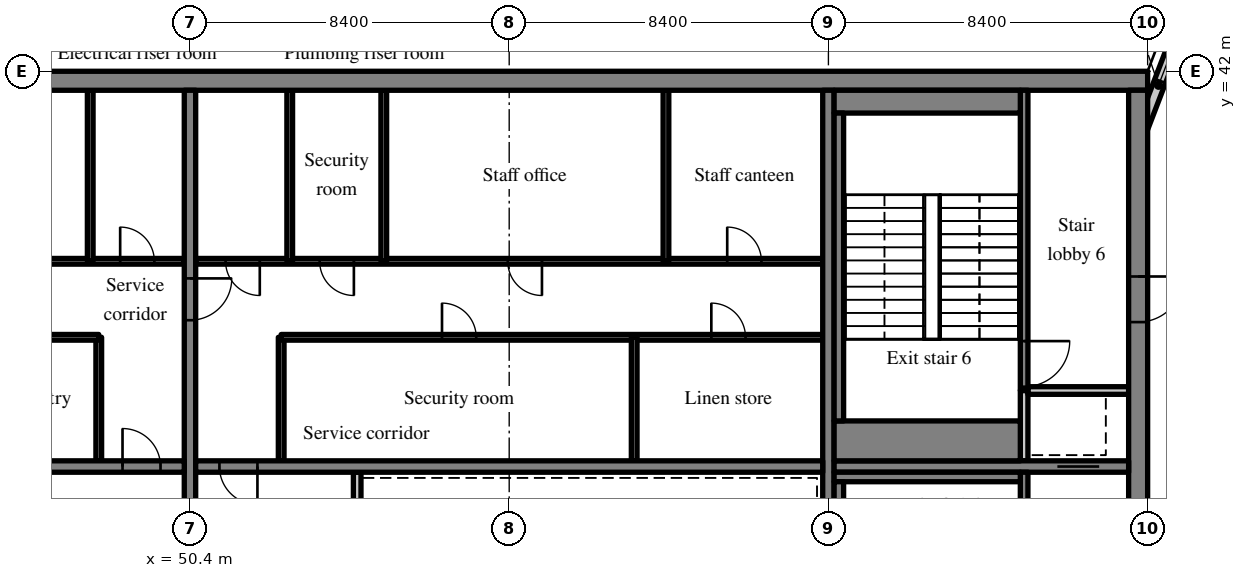
"""IFC4 building model, lengths in metres.
Left out: names, types, materials, properties, quantities, classifications, styles, units other than length and angle.
Written with IfcOpenShell. Run it as: python <this file> out.ifc"""

import sys

from ifc_helpers import new_model, si_unit, direction, frame, frame_2d, origin, place, context, subcontext, project, spatial, rectangle, extrude, source, transform, mapped, element, fill, save


model = new_model("IFC4")
c1 = context("Model", 3, precision=1e-05, world=origin(), true_north=direction((0.0, 1.0)))
c2 = subcontext(c1, "Body", "Model", "MODEL_VIEW")
j1 = project(units=[si_unit("LENGTHUNIT", "METRE"), si_unit("PLANEANGLEUNIT", "RADIAN")], contexts=[c1])
p1 = place(None, origin())
s1 = spatial("IfcSite", under=j1, at=p1, CompositionType="ELEMENT")
p2 = place(p1, origin())
s2 = spatial("IfcBuilding", under=s1, at=p2, CompositionType="ELEMENT")
p3 = place(p2, frame((0.0, 0.0, 313.7)))
s3 = spatial("IfcBuildingStorey", under=s2, at=p3, CompositionType="ELEMENT", Elevation=313.7)
m1 = source(origin(), c2, "Body", "SweptSolid", [
    extrude(rectangle(XDim=50.4, YDim=0.5, at=frame_2d((25.2, 0.0))), origin(), (0.0, 0.0, 1.0), 3.72),
])
p4 = place(p3, frame((25.2, 41.75, 0.0), z_axis=(0.0, 0.0, 1.0), x_axis=(1.0, 0.0, 0.0)))
e1 = element("IfcWall", 1, at=p4, inside=s3, PredefinedType="SHEAR", context=c2, shape_type="MappedRepresentation", body=[
    mapped(m1, transform((0.0, 0.0, 0.0), scale=1.0)),
])
m2 = source(origin(), c2, "Body", "SweptSolid", [
    extrude(rectangle(XDim=19.0, YDim=0.5, at=frame_2d((9.5, 0.0))), origin(), (0.0, 0.0, 1.0), 3.72),
])
p5 = place(p3, frame((75.35, 22.5, 0.0), z_axis=(0.0, 0.0, 1.0), x_axis=(0.0, 1.0, 0.0)))
e2 = element("IfcWall", 2, at=p5, inside=s3, PredefinedType="SHEAR", context=c2, shape_type="MappedRepresentation", body=[
    mapped(m2, transform((0.0, 0.0, 0.0), scale=1.0)),
])
m3 = source(origin(), c2, "Body", "SweptSolid", [
    extrude(rectangle(XDim=1.2, YDim=2.1, at=frame_2d((0.6, 1.05))), frame((0.0, 0.26, 0.0), z_axis=(0.0, -1.0, 0.0), x_axis=(1.0, 0.0, 0.0)), (0.0, 0.0, 1.0), 0.52),
])
p6 = place(p5, frame((12.9, 0.0, 0.0)))
e3 = element("IfcOpeningElement", 3, at=p6, cuts=e2, PredefinedType="OPENING", context=c2, shape_type="MappedRepresentation", body=[
    mapped(m3, transform((0.0, 0.0, 0.0), scale=1.0)),
])
m4 = source(origin(), c2, "Body", "SweptSolid", [
    extrude(rectangle(XDim=19.0, YDim=0.3, at=frame_2d((9.5, 0.0))), origin(), (0.0, 0.0, 1.0), 3.72),
])
p7 = place(p3, frame((50.4, 22.5, 0.0), z_axis=(0.0, 0.0, 1.0), x_axis=(0.0, 1.0, 0.0)))
e4 = element("IfcWall", 4, at=p7, inside=s3, PredefinedType="SHEAR", context=c2, shape_type="MappedRepresentation", body=[
    mapped(m4, transform((0.0, 0.0, 0.0), scale=1.0)),
])
m5 = source(origin(), c2, "Body", "SweptSolid", [
    extrude(rectangle(XDim=1.1, YDim=2.1, at=frame_2d((0.55, 1.05))), frame((0.0, 0.16, 0.0), z_axis=(0.0, -1.0, 0.0), x_axis=(1.0, 0.0, 0.0)), (0.0, 0.0, 1.0), 0.32),
])
p8 = place(p7, frame((12.95, 0.0, 0.0)))
e5 = element("IfcOpeningElement", 5, at=p8, cuts=e4, PredefinedType="OPENING", context=c2, shape_type="MappedRepresentation", body=[
    mapped(m5, transform((0.0, 0.0, 0.0), scale=1.0)),
])
p9 = place(p3, frame((67.2, 22.5, 0.0), z_axis=(0.0, 0.0, 1.0), x_axis=(0.0, 1.0, 0.0)))
e6 = element("IfcWall", 6, at=p9, inside=s3, PredefinedType="SHEAR", context=c2, shape_type="MappedRepresentation", body=[
    mapped(m4, transform((0.0, 0.0, 0.0), scale=1.0)),
])
m6 = source(origin(), c2, "Body", "SweptSolid", [
    extrude(rectangle(XDim=16.5, YDim=0.3, at=frame_2d((8.25, 0.0))), origin(), (0.0, 0.0, 1.0), 3.72),
])
p10 = place(p3, frame((33.75, 31.6, 0.0), z_axis=(0.0, 0.0, 1.0), x_axis=(1.0, 0.0, 0.0)))
e7 = element("IfcWall", 7, at=p10, inside=s3, PredefinedType="SHEAR", context=c2, shape_type="MappedRepresentation", body=[
    mapped(m6, transform((0.0, 0.0, 0.0), scale=1.0)),
])
m7 = source(origin(), c2, "Body", "SweptSolid", [
    extrude(rectangle(XDim=1.0, YDim=2.1, at=frame_2d((0.5, 1.05))), frame((0.0, 0.16, 0.0), z_axis=(0.0, -1.0, 0.0), x_axis=(1.0, 0.0, 0.0)), (0.0, 0.0, 1.0), 0.32),
])
p11 = place(p10, frame((14.875, 0.0, 0.0)))
e8 = element("IfcOpeningElement", 8, at=p11, cuts=e7, PredefinedType="OPENING", context=c2, shape_type="MappedRepresentation", body=[
    mapped(m7, transform((0.0, 0.0, 0.0), scale=1.0)),
])
p12 = place(p3, frame((50.55, 31.6, 0.0), z_axis=(0.0, 0.0, 1.0), x_axis=(1.0, 0.0, 0.0)))
e9 = element("IfcWall", 9, at=p12, inside=s3, PredefinedType="SHEAR", context=c2, shape_type="MappedRepresentation", body=[
    mapped(m6, transform((0.0, 0.0, 0.0), scale=1.0)),
])
p13 = place(p12, frame((0.625, 0.0, 0.0)))
e10 = element("IfcOpeningElement", 10, at=p13, cuts=e9, PredefinedType="OPENING", context=c2, shape_type="MappedRepresentation", body=[
    mapped(m7, transform((0.0, 0.0, 0.0), scale=1.0)),
])
m8 = source(origin(), c2, "Body", "SweptSolid", [
    extrude(rectangle(XDim=7.75, YDim=0.3, at=frame_2d((3.875, 0.0))), origin(), (0.0, 0.0, 1.0), 3.72),
])
p14 = place(p3, frame((67.35, 31.6, 0.0), z_axis=(0.0, 0.0, 1.0), x_axis=(1.0, 0.0, 0.0)))
e11 = element("IfcWall", 11, at=p14, inside=s3, PredefinedType="SHEAR", context=c2, shape_type="MappedRepresentation", body=[
    mapped(m8, transform((0.0, 0.0, 0.0), scale=1.0)),
])
p15 = place(p14, frame((5.875, 0.0, 0.0)))
e12 = element("IfcOpeningElement", 12, at=p15, cuts=e11, PredefinedType="OPENING", context=c2, shape_type="MappedRepresentation", body=[
    mapped(m5, transform((0.0, 0.0, 0.0), scale=1.0)),
])
m9 = source(origin(), c2, "Body", "SweptSolid", [
    extrude(rectangle(XDim=3.559, YDim=0.3, at=frame_2d((1.78, 0.0))), origin(), (0.0, 0.0, 1.0), 3.72),
])
p16 = place(p3, frame((76.523, 43.292, 0.0), z_axis=(0.0, 0.0, 1.0), x_axis=(-0.35779745313, -0.933799219604, 0.0)))
e13 = element("IfcWall", 13, at=p16, inside=s3, PredefinedType="SOLIDWALL", context=c2, shape_type="MappedRepresentation", body=[
    mapped(m9, transform((0.0, 0.0, 0.0), scale=1.0)),
])
m10 = source(origin(), c2, "Body", "SweptSolid", [
    extrude(rectangle(XDim=1.5, YDim=2.0, at=frame_2d((0.75, 1.0))), frame((0.0, 0.16, 0.0), z_axis=(0.0, -1.0, 0.0), x_axis=(1.0, 0.0, 0.0)), (0.0, 0.0, 1.0), 0.32),
])
p17 = place(p16, frame((0.156, 0.0, 0.9)))
e14 = element("IfcOpeningElement", 14, at=p17, cuts=e13, PredefinedType="OPENING", context=c2, shape_type="MappedRepresentation", body=[
    mapped(m10, transform((0.0, 0.0, 0.0), scale=1.0)),
])
m11 = source(origin(), c2, "Body", "SweptSolid", [
    extrude(rectangle(XDim=3.25, YDim=0.15, at=frame_2d((1.625, 0.0))), origin(), (0.0, 0.0, 1.0), 3.72),
])
p18 = place(p3, frame((48.0, 31.75, 0.0), z_axis=(0.0, 0.0, 1.0), x_axis=(0.0, 1.0, 0.0)))
e15 = element("IfcWall", 15, at=p18, inside=s3, PredefinedType="PARTITIONING", context=c2, shape_type="MappedRepresentation", body=[
    mapped(m11, transform((0.0, 0.0, 0.0), scale=1.0)),
])
m12 = source(origin(), c2, "Body", "SweptSolid", [
    extrude(rectangle(XDim=14.25, YDim=0.15, at=frame_2d((7.125, 0.0))), origin(), (0.0, 0.0, 1.0), 3.72),
])
p19 = place(p3, frame((33.75, 35.0, 0.0), z_axis=(0.0, 0.0, 1.0), x_axis=(1.0, 0.0, 0.0)))
e16 = element("IfcWall", 16, at=p19, inside=s3, PredefinedType="PARTITIONING", context=c2, shape_type="MappedRepresentation", body=[
    mapped(m12, transform((0.0, 0.0, 0.0), scale=1.0)),
])
m13 = source(origin(), c2, "Body", "SweptSolid", [
    extrude(rectangle(XDim=0.9, YDim=2.1, at=frame_2d((0.45, 1.05))), frame((0.0, 0.085, 0.0), z_axis=(0.0, -1.0, 0.0), x_axis=(1.0, 0.0, 0.0)), (0.0, 0.0, 1.0), 0.17),
])
p20 = place(p19, frame((0.968, 0.0, 0.0)))
e17 = element("IfcOpeningElement", 17, at=p20, cuts=e16, PredefinedType="OPENING", context=c2, shape_type="MappedRepresentation", body=[
    mapped(m13, transform((0.0, 0.0, 0.0), scale=1.0)),
])
p21 = place(p19, frame((5.929, 0.0, 0.0)))
e18 = element("IfcOpeningElement", 18, at=p21, cuts=e16, PredefinedType="OPENING", context=c2, shape_type="MappedRepresentation", body=[
    mapped(m13, transform((0.0, 0.0, 0.0), scale=1.0)),
])
p22 = place(p19, frame((11.599, 0.0, 0.0)))
e19 = element("IfcOpeningElement", 19, at=p22, cuts=e16, PredefinedType="OPENING", context=c2, shape_type="MappedRepresentation", body=[
    mapped(m13, transform((0.0, 0.0, 0.0), scale=1.0)),
])
m14 = source(origin(), c2, "Body", "SweptSolid", [
    extrude(rectangle(XDim=16.5, YDim=0.15, at=frame_2d((8.25, 0.0))), origin(), (0.0, 0.0, 1.0), 3.72),
])
p23 = place(p3, frame((33.75, 37.0, 0.0), z_axis=(0.0, 0.0, 1.0), x_axis=(1.0, 0.0, 0.0)))
e20 = element("IfcWall", 20, at=p23, inside=s3, PredefinedType="PARTITIONING", context=c2, shape_type="MappedRepresentation", body=[
    mapped(m14, transform((0.0, 0.0, 0.0), scale=1.0)),
])
p24 = place(p23, frame((6.563, 0.0, 0.0)))
e21 = element("IfcOpeningElement", 21, at=p24, cuts=e20, PredefinedType="OPENING", context=c2, shape_type="MappedRepresentation", body=[
    mapped(m13, transform((0.0, 0.0, 0.0), scale=1.0)),
])
p25 = place(p23, frame((14.813, 0.0, 0.0)))
e22 = element("IfcOpeningElement", 22, at=p25, cuts=e20, PredefinedType="OPENING", context=c2, shape_type="MappedRepresentation", body=[
    mapped(m13, transform((0.0, 0.0, 0.0), scale=1.0)),
])
m15 = source(origin(), c2, "Body", "SweptSolid", [
    extrude(rectangle(XDim=4.5, YDim=0.15, at=frame_2d((2.25, 0.0))), origin(), (0.0, 0.0, 1.0), 3.72),
])
p26 = place(p3, frame((47.775, 37.0, 0.0), z_axis=(0.0, 0.0, 1.0), x_axis=(0.0, 1.0, 0.0)))
e23 = element("IfcWall", 23, at=p26, inside=s3, PredefinedType="PARTITIONING", context=c2, shape_type="MappedRepresentation", body=[
    mapped(m15, transform((0.0, 0.0, 0.0), scale=1.0)),
])
m16 = source(origin(), c2, "Body", "SweptSolid", [
    extrude(rectangle(XDim=2.65, YDim=0.2, at=frame_2d((1.325, 0.0))), origin(), (0.0, 0.0, 1.0), 3.72),
])
p27 = place(p3, frame((54.8, 28.8, 0.0), z_axis=(0.0, 0.0, 1.0), x_axis=(0.0, 1.0, 0.0)))
e24 = element("IfcWall", 24, at=p27, inside=s3, PredefinedType="SOLIDWALL", context=c2, shape_type="MappedRepresentation", body=[
    mapped(m16, transform((0.0, 0.0, 0.0), scale=1.0)),
])
p28 = place(p3, frame((52.8, 31.75, 0.0), z_axis=(0.0, 0.0, 1.0), x_axis=(0.0, 1.0, 0.0)))
e25 = element("IfcWall", 25, at=p28, inside=s3, PredefinedType="PARTITIONING", context=c2, shape_type="MappedRepresentation", body=[
    mapped(m11, transform((0.0, 0.0, 0.0), scale=1.0)),
])
p29 = place(p3, frame((67.05, 35.0, 0.0), z_axis=(0.0, 0.0, 1.0), x_axis=(-1.0, 0.0, 0.0)))
e26 = element("IfcWall", 26, at=p29, inside=s3, PredefinedType="PARTITIONING", context=c2, shape_type="MappedRepresentation", body=[
    mapped(m12, transform((0.0, 0.0, 0.0), scale=1.0)),
])
p30 = place(p29, frame((2.031, 0.0, 0.0)))
e27 = element("IfcOpeningElement", 27, at=p30, cuts=e26, PredefinedType="OPENING", context=c2, shape_type="MappedRepresentation", body=[
    mapped(m13, transform((0.0, 0.0, 0.0), scale=1.0)),
])
p31 = place(p29, frame((9.118, 0.0, 0.0)))
e28 = element("IfcOpeningElement", 28, at=p31, cuts=e26, PredefinedType="OPENING", context=c2, shape_type="MappedRepresentation", body=[
    mapped(m13, transform((0.0, 0.0, 0.0), scale=1.0)),
])
p32 = place(p3, frame((67.05, 37.0, 0.0), z_axis=(0.0, 0.0, 1.0), x_axis=(-1.0, 0.0, 0.0)))
e29 = element("IfcWall", 29, at=p32, inside=s3, PredefinedType="PARTITIONING", context=c2, shape_type="MappedRepresentation", body=[
    mapped(m14, transform((0.0, 0.0, 0.0), scale=1.0)),
])
p33 = place(p32, frame((1.613, 0.0, 0.0)))
e30 = element("IfcOpeningElement", 30, at=p33, cuts=e29, PredefinedType="OPENING", context=c2, shape_type="MappedRepresentation", body=[
    mapped(m13, transform((0.0, 0.0, 0.0), scale=1.0)),
])
p34 = place(p32, frame((7.388, 0.0, 0.0)))
e31 = element("IfcOpeningElement", 31, at=p34, cuts=e29, PredefinedType="OPENING", context=c2, shape_type="MappedRepresentation", body=[
    mapped(m13, transform((0.0, 0.0, 0.0), scale=1.0)),
])
p35 = place(p32, frame((12.337, 0.0, 0.0)))
e32 = element("IfcOpeningElement", 32, at=p35, cuts=e29, PredefinedType="OPENING", context=c2, shape_type="MappedRepresentation", body=[
    mapped(m13, transform((0.0, 0.0, 0.0), scale=1.0)),
])
p36 = place(p32, frame((14.813, 0.0, 0.0)))
e33 = element("IfcOpeningElement", 33, at=p36, cuts=e29, PredefinedType="OPENING", context=c2, shape_type="MappedRepresentation", body=[
    mapped(m13, transform((0.0, 0.0, 0.0), scale=1.0)),
])
p37 = place(p3, frame((62.089, 31.75, 0.0), z_axis=(0.0, 0.0, 1.0), x_axis=(0.0, 1.0, 0.0)))
e34 = element("IfcWall", 34, at=p37, inside=s3, PredefinedType="PARTITIONING", context=c2, shape_type="MappedRepresentation", body=[
    mapped(m11, transform((0.0, 0.0, 0.0), scale=1.0)),
])
for number, where, z_axis, x_axis in (
    (35, (62.925, 37.0, 0.0), (0.0, 0.0, 1.0), (0.0, 1.0, 0.0)),
    (36, (55.5, 37.0, 0.0), (0.0, 0.0, 1.0), (0.0, 1.0, 0.0)),
    (37, (53.025, 37.0, 0.0), (0.0, 0.0, 1.0), (0.0, 1.0, 0.0)),
):
    element("IfcWall", number, at=place(p3, frame(where, z_axis=z_axis, x_axis=x_axis)), inside=s3, PredefinedType="PARTITIONING", context=c2, shape_type="MappedRepresentation", body=[
        mapped(m15, transform((0.0, 0.0, 0.0), scale=1.0)),
    ])
m17 = source(origin(), c2, "Body", "SweptSolid", [
    extrude(rectangle(XDim=8.95, YDim=0.2, at=frame_2d((4.475, 0.0))), origin(), (0.0, 0.0, 1.0), 3.72),
])
p38 = place(p3, frame((72.35, 22.5, 0.0), z_axis=(0.0, 0.0, 1.0), x_axis=(0.0, 1.0, 0.0)))
e38 = element("IfcWall", 38, at=p38, inside=s3, PredefinedType="SOLIDWALL", context=c2, shape_type="MappedRepresentation", body=[
    mapped(m17, transform((0.0, 0.0, 0.0), scale=1.0)),
])
m18 = source(origin(), c2, "Body", "SweptSolid", [
    extrude(rectangle(XDim=1.2, YDim=2.1, at=frame_2d((0.6, 1.05))), frame((0.0, 0.11, 0.0), z_axis=(0.0, -1.0, 0.0), x_axis=(1.0, 0.0, 0.0)), (0.0, 0.0, 1.0), 0.22),
])
p39 = place(p38, frame((1.1, 0.0, 0.0)))
e39 = element("IfcOpeningElement", 39, at=p39, cuts=e38, PredefinedType="OPENING", context=c2, shape_type="MappedRepresentation", body=[
    mapped(m18, transform((0.0, 0.0, 0.0), scale=1.0)),
])
m19 = source(origin(), c2, "Body", "SweptSolid", [
    extrude(rectangle(XDim=1.85, YDim=0.2, at=frame_2d((0.925, 0.0))), origin(), (0.0, 0.0, 1.0), 3.72),
])
p40 = place(p3, frame((72.35, 31.75, 0.0), z_axis=(0.0, 0.0, 1.0), x_axis=(0.0, 1.0, 0.0)))
e40 = element("IfcWall", 40, at=p40, inside=s3, PredefinedType="SOLIDWALL", context=c2, shape_type="MappedRepresentation", body=[
    mapped(m19, transform((0.0, 0.0, 0.0), scale=1.0)),
])
m20 = source(origin(), c2, "Body", "SweptSolid", [
    extrude(rectangle(XDim=2.65, YDim=0.2, at=frame_2d((1.325, 0.0))), origin(), (0.0, 0.0, 1.0), 3.72),
])
p41 = place(p3, frame((72.45, 33.6, 0.0), z_axis=(0.0, 0.0, 1.0), x_axis=(1.0, 0.0, 0.0)))
e41 = element("IfcWall", 41, at=p41, inside=s3, PredefinedType="SOLIDWALL", context=c2, shape_type="MappedRepresentation", body=[
    mapped(m20, transform((0.0, 0.0, 0.0), scale=1.0)),
])
m21 = source(origin(), c2, "Body", "SweptSolid", [
    extrude(rectangle(XDim=7.9, YDim=0.2, at=frame_2d((3.95, 0.0))), origin(), (0.0, 0.0, 1.0), 3.72),
])
p42 = place(p3, frame((72.35, 33.6, 0.0), z_axis=(0.0, 0.0, 1.0), x_axis=(0.0, 1.0, 0.0)))
e42 = element("IfcWall", 42, at=p42, inside=s3, PredefinedType="SOLIDWALL", context=c2, shape_type="MappedRepresentation", body=[
    mapped(m21, transform((0.0, 0.0, 0.0), scale=1.0)),
])
p43 = place(p42, frame((0.1, 0.0, 0.0)))
e43 = element("IfcOpeningElement", 43, at=p43, cuts=e42, PredefinedType="OPENING", context=c2, shape_type="MappedRepresentation", body=[
    mapped(m18, transform((0.0, 0.0, 0.0), scale=1.0)),
])
m22 = source(origin(), c2, "Body", "SweptSolid", [
    extrude(rectangle(XDim=4.9, YDim=0.25, at=frame_2d((2.45, 0.0))), origin(), (0.0, 0.0, 1.0), 3.72),
])
p44 = place(p3, frame((67.35, 31.325, 0.0), z_axis=(0.0, 0.0, 1.0), x_axis=(1.0, 0.0, 0.0)))
e44 = element("IfcWall", 44, at=p44, inside=s3, PredefinedType="SOLIDWALL", context=c2, shape_type="MappedRepresentation", body=[
    mapped(m22, transform((0.0, 0.0, 0.0), scale=1.0)),
])
m23 = source(origin(), c2, "Body", "SweptSolid", [
    extrude(rectangle(XDim=8.1, YDim=0.25, at=frame_2d((4.05, 0.0))), origin(), (0.0, 0.0, 1.0), 3.72),
])
p45 = place(p3, frame((67.475, 23.1, 0.0), z_axis=(0.0, 0.0, 1.0), x_axis=(0.0, 1.0, 0.0)))
e45 = element("IfcWall", 45, at=p45, inside=s3, PredefinedType="SOLIDWALL", context=c2, shape_type="MappedRepresentation", body=[
    mapped(m23, transform((0.0, 0.0, 0.0), scale=1.0)),
])
m24 = source(origin(), c2, "Body", "SweptSolid", [
    extrude(rectangle(XDim=4.9, YDim=0.6, at=frame_2d((2.45, 0.0))), origin(), (0.0, 0.0, 1.0), 3.72),
])
p46 = place(p3, frame((67.35, 41.2, 0.0), z_axis=(0.0, 0.0, 1.0), x_axis=(1.0, 0.0, 0.0)))
e46 = element("IfcWall", 46, at=p46, inside=s3, PredefinedType="SOLIDWALL", context=c2, shape_type="MappedRepresentation", body=[
    mapped(m24, transform((0.0, 0.0, 0.0), scale=1.0)),
])
m25 = source(origin(), c2, "Body", "SweptSolid", [
    extrude(rectangle(XDim=4.9, YDim=1.05, at=frame_2d((2.45, 0.0))), origin(), (0.0, 0.0, 1.0), 3.72),
])
p47 = place(p3, frame((67.35, 32.275, 0.0), z_axis=(0.0, 0.0, 1.0), x_axis=(1.0, 0.0, 0.0)))
e47 = element("IfcWall", 47, at=p47, inside=s3, PredefinedType="SOLIDWALL", context=c2, shape_type="MappedRepresentation", body=[
    mapped(m25, transform((0.0, 0.0, 0.0), scale=1.0)),
])
p48 = place(p3, frame((67.475, 32.8, 0.0), z_axis=(0.0, 0.0, 1.0), x_axis=(0.0, 1.0, 0.0)))
e48 = element("IfcWall", 48, at=p48, inside=s3, PredefinedType="SOLIDWALL", context=c2, shape_type="MappedRepresentation", body=[
    mapped(m23, transform((0.0, 0.0, 0.0), scale=1.0)),
])
m26 = source(origin(), c2, "Body", "SweptSolid", [
    extrude(rectangle(XDim=1.5, YDim=2.0, at=frame_2d((0.75, 1.0))), frame((0.0, 0.03, 0.0), z_axis=(0.0, -1.0, 0.0), x_axis=(1.0, 0.0, 0.0)), (0.0, 0.0, 1.0), 0.06),
])
p49 = place(p17, origin())
e49 = element("IfcWindow", 49, at=p49, inside=s3, PartitioningType="SINGLE_PANEL", PredefinedType="WINDOW", context=c2, shape_type="MappedRepresentation", body=[
    mapped(m26, transform((0.0, 0.0, 0.0), scale=1.0)),
])
fill(e14, e49)
m27 = source(origin(), c2, "Body", "SweptSolid", [
    extrude(rectangle(XDim=1.0, YDim=2.1, at=frame_2d((0.5, 1.05))), frame((0.0, 0.025, 0.0), z_axis=(0.0, -1.0, 0.0), x_axis=(1.0, 0.0, 0.0)), (0.0, 0.0, 1.0), 0.05),
])
p50 = place(p11, origin())
e50 = element("IfcDoor", 50, at=p50, inside=s3, OperationType="SINGLE_SWING_LEFT", PredefinedType="DOOR", context=c2, shape_type="MappedRepresentation", body=[
    mapped(m27, transform((0.0, 0.0, 0.0), scale=1.0)),
])
fill(e8, e50)
m28 = source(origin(), c2, "Body", "SweptSolid", [
    extrude(rectangle(XDim=0.9, YDim=2.1, at=frame_2d((0.45, 1.05))), frame((0.0, 0.025, 0.0), z_axis=(0.0, -1.0, 0.0), x_axis=(1.0, 0.0, 0.0)), (0.0, 0.0, 1.0), 0.05),
])
p51 = place(p25, origin())
e51 = element("IfcDoor", 51, at=p51, inside=s3, OperationType="SINGLE_SWING_LEFT", PredefinedType="DOOR", context=c2, shape_type="MappedRepresentation", body=[
    mapped(m28, transform((0.0, 0.0, 0.0), scale=1.0)),
])
fill(e22, e51)
p52 = place(p13, origin())
e52 = element("IfcDoor", 52, at=p52, inside=s3, OperationType="SINGLE_SWING_RIGHT", PredefinedType="DOOR", context=c2, shape_type="MappedRepresentation", body=[
    mapped(m27, transform((0.0, 0.0, 0.0), scale=1.0)),
])
fill(e10, e52)
p53 = place(p30, origin())
e53 = element("IfcDoor", 53, at=p53, inside=s3, OperationType="SINGLE_SWING_RIGHT", PredefinedType="DOOR", context=c2, shape_type="MappedRepresentation", body=[
    mapped(m28, transform((0.0, 0.0, 0.0), scale=1.0)),
])
fill(e27, e53)
p54 = place(p31, origin())
e54 = element("IfcDoor", 54, at=p54, inside=s3, OperationType="SINGLE_SWING_RIGHT", PredefinedType="DOOR", context=c2, shape_type="MappedRepresentation", body=[
    mapped(m28, transform((0.0, 0.0, 0.0), scale=1.0)),
])
fill(e28, e54)
p55 = place(p33, origin())
e55 = element("IfcDoor", 55, at=p55, inside=s3, OperationType="SINGLE_SWING_RIGHT", PredefinedType="DOOR", context=c2, shape_type="MappedRepresentation", body=[
    mapped(m28, transform((0.0, 0.0, 0.0), scale=1.0)),
])
fill(e30, e55)
p56 = place(p34, origin())
e56 = element("IfcDoor", 56, at=p56, inside=s3, OperationType="SINGLE_SWING_LEFT", PredefinedType="DOOR", context=c2, shape_type="MappedRepresentation", body=[
    mapped(m28, transform((0.0, 0.0, 0.0), scale=1.0)),
])
fill(e31, e56)
p57 = place(p35, origin())
e57 = element("IfcDoor", 57, at=p57, inside=s3, OperationType="SINGLE_SWING_LEFT", PredefinedType="DOOR", context=c2, shape_type="MappedRepresentation", body=[
    mapped(m28, transform((0.0, 0.0, 0.0), scale=1.0)),
])
fill(e32, e57)
p58 = place(p36, origin())
e58 = element("IfcDoor", 58, at=p58, inside=s3, OperationType="SINGLE_SWING_LEFT", PredefinedType="DOOR", context=c2, shape_type="MappedRepresentation", body=[
    mapped(m28, transform((0.0, 0.0, 0.0), scale=1.0)),
])
fill(e33, e58)
m29 = source(origin(), c2, "Body", "SweptSolid", [
    extrude(rectangle(XDim=1.1, YDim=2.1, at=frame_2d((0.55, 1.05))), frame((0.0, 0.025, 0.0), z_axis=(0.0, -1.0, 0.0), x_axis=(1.0, 0.0, 0.0)), (0.0, 0.0, 1.0), 0.05),
])
p59 = place(p15, origin())
e59 = element("IfcDoor", 59, at=p59, inside=s3, OperationType="SLIDING_TO_RIGHT", PredefinedType="DOOR", context=c2, shape_type="MappedRepresentation", body=[
    mapped(m29, transform((0.0, 0.0, 0.0), scale=1.0)),
])
fill(e12, e59)
m30 = source(origin(), c2, "Body", "SweptSolid", [
    extrude(rectangle(XDim=1.2, YDim=2.1, at=frame_2d((0.6, 1.05))), frame((0.0, 0.025, 0.0), z_axis=(0.0, -1.0, 0.0), x_axis=(1.0, 0.0, 0.0)), (0.0, 0.0, 1.0), 0.05),
])
p60 = place(p43, origin())
e60 = element("IfcDoor", 60, at=p60, inside=s3, OperationType="SINGLE_SWING_RIGHT", PredefinedType="DOOR", context=c2, shape_type="MappedRepresentation", body=[
    mapped(m30, transform((0.0, 0.0, 0.0), scale=1.0)),
])
fill(e43, e60)
p61 = place(p6, origin())
e61 = element("IfcDoor", 61, at=p61, inside=s3, OperationType="SINGLE_SWING_RIGHT", PredefinedType="DOOR", context=c2, shape_type="MappedRepresentation", body=[
    mapped(m30, transform((0.0, 0.0, 0.0), scale=1.0)),
])
fill(e3, e61)
p62 = place(p8, origin())
e62 = element("IfcDoor", 62, at=p62, inside=s3, OperationType="SINGLE_SWING_RIGHT", PredefinedType="DOOR", context=c2, shape_type="MappedRepresentation", body=[
    mapped(m29, transform((0.0, 0.0, 0.0), scale=1.0)),
])
fill(e5, e62)
save(model, sys.argv[1])
